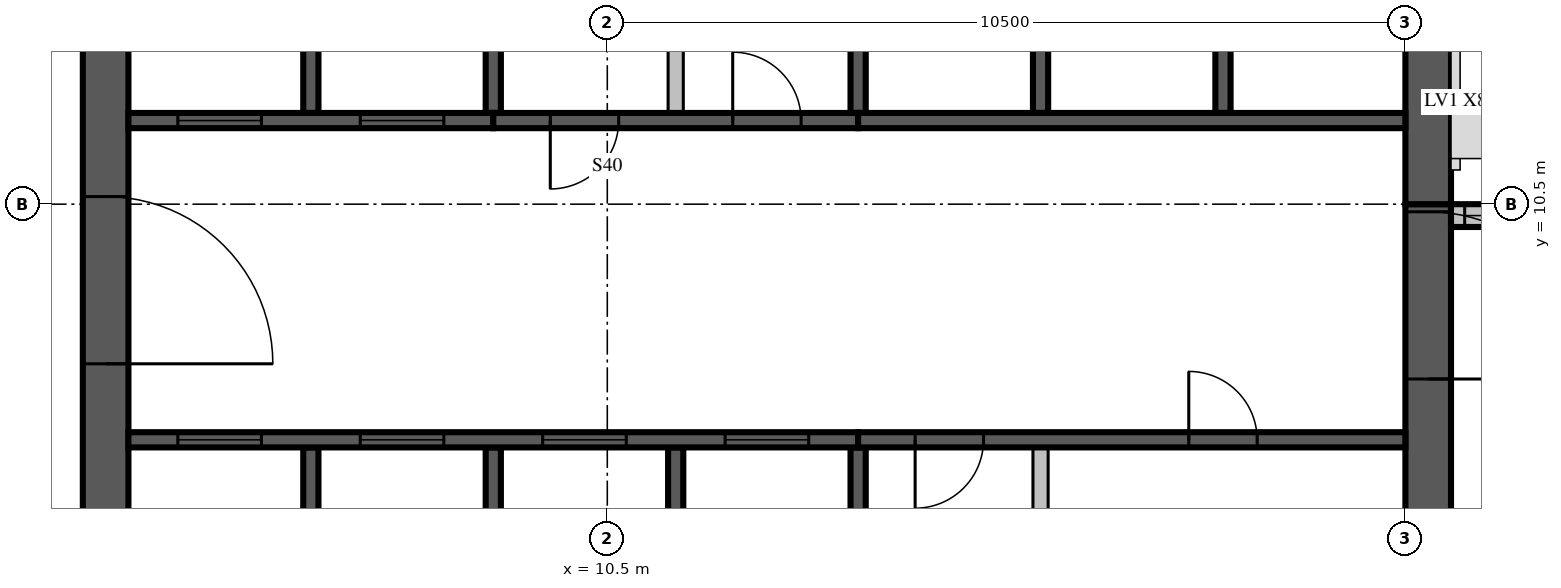
"""IFC4 building model, lengths in metres.
Left out: names, types, materials, properties, quantities, classifications, styles, units other than length and angle.
Written with IfcOpenShell. Run it as: python <this file> out.ifc"""

import sys

from ifc_helpers import new_model, si_unit, direction, frame, frame_2d, origin, place, context, subcontext, project, spatial, rectangle, extrude, source, transform, mapped, element, fill, save


model = new_model("IFC4")
c1 = context("Model", 3, precision=1e-05, world=origin(), true_north=direction((0.0, 1.0)))
c2 = subcontext(c1, "Body", "Model", "MODEL_VIEW")
j1 = project(units=[si_unit("LENGTHUNIT", "METRE"), si_unit("PLANEANGLEUNIT", "RADIAN")], contexts=[c1])
p1 = place(None, origin())
s1 = spatial("IfcSite", under=j1, at=p1, CompositionType="ELEMENT")
p2 = place(p1, origin())
s2 = spatial("IfcBuilding", under=s1, at=p2, CompositionType="ELEMENT")
p3 = place(p2, frame((0.0, 0.0, 361.5)))
s3 = spatial("IfcBuildingStorey", under=s2, at=p3, CompositionType="ELEMENT", Elevation=361.5)
m1 = source(origin(), c2, "Body", "SweptSolid", [
    extrude(rectangle(XDim=17.4, YDim=0.6, at=frame_2d((8.7, 0.0))), origin(), (0.0, 0.0, 1.0), 3.5),
])
p4 = place(p3, frame((3.9, 4.2, 0.0), z_axis=(0.0, 0.0, 1.0), x_axis=(0.0, 1.0, 0.0)))
e1 = element("IfcWall", 1, at=p4, inside=s3, PredefinedType="SHEAR", context=c2, shape_type="MappedRepresentation", body=[
    mapped(m1, transform((0.0, 0.0, 0.0), scale=1.0)),
])
m2 = source(origin(), c2, "Body", "SweptSolid", [
    extrude(rectangle(XDim=2.2, YDim=2.1, at=frame_2d((1.1, 1.05))), frame((0.0, 0.31, 0.0), z_axis=(0.0, -1.0, 0.0), x_axis=(1.0, 0.0, 0.0)), (0.0, 0.0, 1.0), 0.62),
])
p5 = place(p4, frame((4.2, 0.0, 0.0)))
e2 = element("IfcOpeningElement", 2, at=p5, cuts=e1, PredefinedType="OPENING", context=c2, shape_type="MappedRepresentation", body=[
    mapped(m2, transform((0.0, 0.0, 0.0), scale=1.0)),
])
m3 = source(origin(), c2, "Body", "SweptSolid", [
    extrude(rectangle(XDim=6.3, YDim=0.6, at=frame_2d((3.15, 0.0))), origin(), (0.0, 0.0, 1.0), 3.5),
])
p6 = place(p3, frame((21.3, 4.2, 0.0), z_axis=(0.0, 0.0, 1.0), x_axis=(0.0, 1.0, 0.0)))
e3 = element("IfcWall", 3, at=p6, inside=s3, PredefinedType="SHEAR", context=c2, shape_type="MappedRepresentation", body=[
    mapped(m3, transform((0.0, 0.0, 0.0), scale=1.0)),
])
p7 = place(p6, frame((4.0, 0.0, 0.0)))
e4 = element("IfcOpeningElement", 4, at=p7, cuts=e3, PredefinedType="OPENING", context=c2, shape_type="MappedRepresentation", body=[
    mapped(m2, transform((0.0, 0.0, 0.0), scale=1.0)),
])
m4 = source(origin(), c2, "Body", "SweptSolid", [
    extrude(rectangle(XDim=10.5, YDim=0.6, at=frame_2d((5.25, 0.0))), origin(), (0.0, 0.0, 1.0), 3.5),
])
p8 = place(p3, frame((21.3, 10.5, 0.0), z_axis=(0.0, 0.0, 1.0), x_axis=(0.0, 1.0, 0.0)))
e5 = element("IfcWall", 5, at=p8, inside=s3, PredefinedType="SHEAR", context=c2, shape_type="MappedRepresentation", body=[
    mapped(m4, transform((0.0, 0.0, 0.0), scale=1.0)),
])
m5 = source(origin(), c2, "Body", "SweptSolid", [
    extrude(rectangle(XDim=1.2, YDim=2.4, at=frame_2d((0.6, 1.2))), frame((0.0, 0.31, 0.0), z_axis=(0.0, -1.0, 0.0), x_axis=(1.0, 0.0, 0.0)), (0.0, 0.0, 1.0), 0.62),
])
p9 = place(p8, frame((5.7, 0.0, 0.6)))
e6 = element("IfcOpeningElement", 6, at=p9, cuts=e5, PredefinedType="OPENING", context=c2, shape_type="MappedRepresentation", body=[
    mapped(m5, transform((0.0, 0.0, 0.0), scale=1.0)),
])
m6 = source(origin(), c2, "Body", "SweptSolid", [
    extrude(rectangle(XDim=7.5, YDim=0.3, at=frame_2d((3.75, 0.0))), origin(), (0.0, 0.0, 1.0), 3.1),
])
p10 = place(p3, frame((29.1, 10.35, 0.0), z_axis=(0.0, 0.0, 1.0), x_axis=(-1.0, 0.0, 0.0)))
e7 = element("IfcWall", 7, at=p10, inside=s3, PredefinedType="STANDARD", context=c2, shape_type="MappedRepresentation", body=[
    mapped(m6, transform((0.0, 0.0, 0.0), scale=1.0)),
])
m7 = source(origin(), c2, "Body", "SweptSolid", [
    extrude(rectangle(XDim=3.0, YDim=2.0, at=frame_2d((1.5, 1.0))), frame((0.0, 0.16, 0.0), z_axis=(0.0, -1.0, 0.0), x_axis=(1.0, 0.0, 0.0)), (0.0, 0.0, 1.0), 0.32),
])
p11 = place(p10, frame((1.14, 0.0, 0.6)))
e8 = element("IfcOpeningElement", 8, at=p11, cuts=e7, PredefinedType="OPENING", context=c2, shape_type="MappedRepresentation", body=[
    mapped(m7, transform((0.0, 0.0, 0.0), scale=1.0)),
])
m8 = source(origin(), c2, "Body", "SweptSolid", [
    extrude(rectangle(XDim=1.8, YDim=2.0, at=frame_2d((0.9, 1.0))), frame((0.0, 0.16, 0.0), z_axis=(0.0, -1.0, 0.0), x_axis=(1.0, 0.0, 0.0)), (0.0, 0.0, 1.0), 0.32),
])
p12 = place(p10, frame((5.52, 0.0, 0.6)))
e9 = element("IfcOpeningElement", 9, at=p12, cuts=e7, PredefinedType="OPENING", context=c2, shape_type="MappedRepresentation", body=[
    mapped(m8, transform((0.0, 0.0, 0.0), scale=1.0)),
])
m9 = source(origin(), c2, "Body", "SweptSolid", [
    extrude(rectangle(XDim=3.1, YDim=0.2, at=frame_2d((1.55, 0.0))), origin(), (0.0, 0.0, 1.0), 3.5),
])
for number, where, z_axis, x_axis in (
    (10, (6.6, 4.2, 0.0), (0.0, 0.0, 1.0), (0.0, 1.0, 0.0)),
    (11, (9.0, 4.2, 0.0), (0.0, 0.0, 1.0), (0.0, 1.0, 0.0)),
    (12, (11.4, 4.2, 0.0), (0.0, 0.0, 1.0), (0.0, 1.0, 0.0)),
):
    element("IfcWall", number, at=place(p3, frame(where, z_axis=z_axis, x_axis=x_axis)), inside=s3, PredefinedType="SOLIDWALL", context=c2, shape_type="MappedRepresentation", body=[
        mapped(m9, transform((0.0, 0.0, 0.0), scale=1.0)),
    ])
m10 = source(origin(), c2, "Body", "SweptSolid", [
    extrude(rectangle(XDim=3.1, YDim=0.2, at=frame_2d((1.55, 0.0))), origin(), (0.0, 0.0, 1.0), 3.1),
])
p13 = place(p3, frame((13.8, 4.2, 0.0), z_axis=(0.0, 0.0, 1.0), x_axis=(0.0, 1.0, 0.0)))
e13 = element("IfcWall", 13, at=p13, inside=s3, PredefinedType="SOLIDWALL", context=c2, shape_type="MappedRepresentation", body=[
    mapped(m10, transform((0.0, 0.0, 0.0), scale=1.0)),
])
m11 = source(origin(), c2, "Body", "SweptSolid", [
    extrude(rectangle(XDim=3.1, YDim=0.2, at=frame_2d((1.55, 0.0))), origin(), (0.0, 0.0, 1.0), 3.1),
])
p14 = place(p3, frame((16.2, 4.2, 0.0), z_axis=(0.0, 0.0, 1.0), x_axis=(0.0, 1.0, 0.0)))
e14 = element("IfcWall", 14, at=p14, inside=s3, PredefinedType="PARTITIONING", context=c2, shape_type="MappedRepresentation", body=[
    mapped(m11, transform((0.0, 0.0, 0.0), scale=1.0)),
])
m12 = source(origin(), c2, "Body", "SweptSolid", [
    extrude(rectangle(XDim=3.0, YDim=0.2, at=frame_2d((1.5, 0.0))), origin(), (0.0, 0.0, 1.0), 3.5),
])
p15 = place(p3, frame((6.6, 11.7, 0.0), z_axis=(0.0, 0.0, 1.0), x_axis=(0.0, 1.0, 0.0)))
e15 = element("IfcWall", 15, at=p15, inside=s3, PredefinedType="SOLIDWALL", context=c2, shape_type="MappedRepresentation", body=[
    mapped(m12, transform((0.0, 0.0, 0.0), scale=1.0)),
])
m13 = source(origin(), c2, "Body", "SweptSolid", [
    extrude(rectangle(XDim=3.0, YDim=0.2, at=frame_2d((1.5, 0.0))), origin(), (0.0, 0.0, 1.0), 3.1),
])
for number, where, z_axis, x_axis in (
    (16, (9.0, 11.7, 0.0), (0.0, 0.0, 1.0), (0.0, 1.0, 0.0)),
    (17, (13.8, 11.7, 0.0), (0.0, 0.0, 1.0), (0.0, 1.0, 0.0)),
):
    element("IfcWall", number, at=place(p3, frame(where, z_axis=z_axis, x_axis=x_axis)), inside=s3, PredefinedType="SOLIDWALL", context=c2, shape_type="MappedRepresentation", body=[
        mapped(m13, transform((0.0, 0.0, 0.0), scale=1.0)),
    ])
for number, where, z_axis, x_axis in (
    (18, (16.2, 11.7, 0.0), (0.0, 0.0, 1.0), (0.0, 1.0, 0.0)),
    (19, (18.6, 11.7, 0.0), (0.0, 0.0, 1.0), (0.0, 1.0, 0.0)),
):
    element("IfcWall", number, at=place(p3, frame(where, z_axis=z_axis, x_axis=x_axis)), inside=s3, PredefinedType="SOLIDWALL", context=c2, shape_type="MappedRepresentation", body=[
        mapped(m12, transform((0.0, 0.0, 0.0), scale=1.0)),
    ])
m14 = source(origin(), c2, "Body", "SweptSolid", [
    extrude(rectangle(XDim=3.0, YDim=0.2, at=frame_2d((1.5, 0.0))), origin(), (0.0, 0.0, 1.0), 3.1),
])
p16 = place(p3, frame((11.4, 11.7, 0.0), z_axis=(0.0, 0.0, 1.0), x_axis=(0.0, 1.0, 0.0)))
e20 = element("IfcWall", 20, at=p16, inside=s3, PredefinedType="PARTITIONING", context=c2, shape_type="MappedRepresentation", body=[
    mapped(m14, transform((0.0, 0.0, 0.0), scale=1.0)),
])
m15 = source(origin(), c2, "Body", "SweptSolid", [
    extrude(rectangle(XDim=9.6, YDim=0.2, at=frame_2d((4.8, 0.0))), origin(), (0.0, 0.0, 1.0), 3.5),
])
p17 = place(p3, frame((4.2, 7.4, 0.0), z_axis=(0.0, 0.0, 1.0), x_axis=(1.0, 0.0, 0.0)))
e21 = element("IfcWall", 21, at=p17, inside=s3, PredefinedType="SOLIDWALL", context=c2, shape_type="MappedRepresentation", body=[
    mapped(m15, transform((0.0, 0.0, 0.0), scale=1.0)),
])
m16 = source(origin(), c2, "Body", "SweptSolid", [
    extrude(rectangle(XDim=1.1, YDim=2.1, at=frame_2d((0.55, 1.05))), frame((0.0, 0.11, 0.0), z_axis=(0.0, -1.0, 0.0), x_axis=(1.0, 0.0, 0.0)), (0.0, 0.0, 1.0), 0.22),
])
p18 = place(p17, frame((0.65, 0.0, 0.0)))
e22 = element("IfcOpeningElement", 22, at=p18, cuts=e21, PredefinedType="OPENING", context=c2, shape_type="MappedRepresentation", body=[
    mapped(m16, transform((0.0, 0.0, 0.0), scale=1.0)),
])
p19 = place(p17, frame((3.05, 0.0, 0.0)))
e23 = element("IfcOpeningElement", 23, at=p19, cuts=e21, PredefinedType="OPENING", context=c2, shape_type="MappedRepresentation", body=[
    mapped(m16, transform((0.0, 0.0, 0.0), scale=1.0)),
])
p20 = place(p17, frame((5.45, 0.0, 0.0)))
e24 = element("IfcOpeningElement", 24, at=p20, cuts=e21, PredefinedType="OPENING", context=c2, shape_type="MappedRepresentation", body=[
    mapped(m16, transform((0.0, 0.0, 0.0), scale=1.0)),
])
p21 = place(p17, frame((7.85, 0.0, 0.0)))
e25 = element("IfcOpeningElement", 25, at=p21, cuts=e21, PredefinedType="OPENING", context=c2, shape_type="MappedRepresentation", body=[
    mapped(m16, transform((0.0, 0.0, 0.0), scale=1.0)),
])
m17 = source(origin(), c2, "Body", "SweptSolid", [
    extrude(rectangle(XDim=7.2, YDim=0.2, at=frame_2d((3.6, 0.0))), origin(), (0.0, 0.0, 1.0), 3.1),
])
p22 = place(p3, frame((13.8, 7.4, 0.0), z_axis=(0.0, 0.0, 1.0), x_axis=(1.0, 0.0, 0.0)))
e26 = element("IfcWall", 26, at=p22, inside=s3, PredefinedType="SOLIDWALL", context=c2, shape_type="MappedRepresentation", body=[
    mapped(m17, transform((0.0, 0.0, 0.0), scale=1.0)),
])
m18 = source(origin(), c2, "Body", "SweptSolid", [
    extrude(rectangle(XDim=0.9, YDim=2.1, at=frame_2d((0.45, 1.05))), frame((0.0, 0.11, 0.0), z_axis=(0.0, -1.0, 0.0), x_axis=(1.0, 0.0, 0.0)), (0.0, 0.0, 1.0), 0.22),
])
p23 = place(p22, frame((0.75, 0.0, 0.0)))
e27 = element("IfcOpeningElement", 27, at=p23, cuts=e26, PredefinedType="OPENING", context=c2, shape_type="MappedRepresentation", body=[
    mapped(m18, transform((0.0, 0.0, 0.0), scale=1.0)),
])
p24 = place(p22, frame((4.35, 0.0, 0.0)))
e28 = element("IfcOpeningElement", 28, at=p24, cuts=e26, PredefinedType="OPENING", context=c2, shape_type="MappedRepresentation", body=[
    mapped(m18, transform((0.0, 0.0, 0.0), scale=1.0)),
])
m19 = source(origin(), c2, "Body", "SweptSolid", [
    extrude(rectangle(XDim=4.8, YDim=0.2, at=frame_2d((2.4, 0.0))), origin(), (0.0, 0.0, 1.0), 3.5),
])
p25 = place(p3, frame((4.2, 11.6, 0.0), z_axis=(0.0, 0.0, 1.0), x_axis=(1.0, 0.0, 0.0)))
e29 = element("IfcWall", 29, at=p25, inside=s3, PredefinedType="SOLIDWALL", context=c2, shape_type="MappedRepresentation", body=[
    mapped(m19, transform((0.0, 0.0, 0.0), scale=1.0)),
])
p26 = place(p25, frame((0.65, 0.0, 0.0)))
e30 = element("IfcOpeningElement", 30, at=p26, cuts=e29, PredefinedType="OPENING", context=c2, shape_type="MappedRepresentation", body=[
    mapped(m16, transform((0.0, 0.0, 0.0), scale=1.0)),
])
p27 = place(p25, frame((3.05, 0.0, 0.0)))
e31 = element("IfcOpeningElement", 31, at=p27, cuts=e29, PredefinedType="OPENING", context=c2, shape_type="MappedRepresentation", body=[
    mapped(m16, transform((0.0, 0.0, 0.0), scale=1.0)),
])
m20 = source(origin(), c2, "Body", "SweptSolid", [
    extrude(rectangle(XDim=4.8, YDim=0.2, at=frame_2d((2.4, 0.0))), origin(), (0.0, 0.0, 1.0), 3.1),
])
p28 = place(p3, frame((9.0, 11.6, 0.0), z_axis=(0.0, 0.0, 1.0), x_axis=(1.0, 0.0, 0.0)))
e32 = element("IfcWall", 32, at=p28, inside=s3, PredefinedType="SOLIDWALL", context=c2, shape_type="MappedRepresentation", body=[
    mapped(m20, transform((0.0, 0.0, 0.0), scale=1.0)),
])
p29 = place(p28, frame((0.75, 0.0, 0.0)))
e33 = element("IfcOpeningElement", 33, at=p29, cuts=e32, PredefinedType="OPENING", context=c2, shape_type="MappedRepresentation", body=[
    mapped(m18, transform((0.0, 0.0, 0.0), scale=1.0)),
])
p30 = place(p28, frame((3.15, 0.0, 0.0)))
e34 = element("IfcOpeningElement", 34, at=p30, cuts=e32, PredefinedType="OPENING", context=c2, shape_type="MappedRepresentation", body=[
    mapped(m18, transform((0.0, 0.0, 0.0), scale=1.0)),
])
m21 = source(origin(), c2, "Body", "SweptSolid", [
    extrude(rectangle(XDim=7.2, YDim=0.2, at=frame_2d((3.6, 0.0))), origin(), (0.0, 0.0, 1.0), 3.5),
])
p31 = place(p3, frame((13.8, 11.6, 0.0), z_axis=(0.0, 0.0, 1.0), x_axis=(1.0, 0.0, 0.0)))
e35 = element("IfcWall", 35, at=p31, inside=s3, PredefinedType="SOLIDWALL", context=c2, shape_type="MappedRepresentation", body=[
    mapped(m21, transform((0.0, 0.0, 0.0), scale=1.0)),
])
m22 = source(origin(), c2, "Body", "SweptSolid", [
    extrude(rectangle(XDim=1.8, YDim=2.0, at=frame_2d((0.9, 1.0))), frame((0.0, 0.03, 0.0), z_axis=(0.0, -1.0, 0.0), x_axis=(1.0, 0.0, 0.0)), (0.0, 0.0, 1.0), 0.06),
])
p32 = place(p12, origin())
e36 = element("IfcWindow", 36, at=p32, inside=s3, PartitioningType="SINGLE_PANEL", PredefinedType="WINDOW", context=c2, shape_type="MappedRepresentation", body=[
    mapped(m22, transform((0.0, 0.0, 0.0), scale=1.0)),
])
fill(e9, e36)
m23 = source(origin(), c2, "Body", "SweptSolid", [
    extrude(rectangle(XDim=1.1, YDim=2.1, at=frame_2d((0.55, 1.05))), frame((0.0, 0.025, 0.0), z_axis=(0.0, -1.0, 0.0), x_axis=(1.0, 0.0, 0.0)), (0.0, 0.0, 1.0), 0.05),
])
p33 = place(p18, origin())
e37 = element("IfcDoor", 37, at=p33, inside=s3, OperationType="SLIDING_TO_LEFT", PredefinedType="DOOR", context=c2, shape_type="MappedRepresentation", body=[
    mapped(m23, transform((0.0, 0.0, 0.0), scale=1.0)),
])
fill(e22, e37)
p34 = place(p19, origin())
e38 = element("IfcDoor", 38, at=p34, inside=s3, OperationType="SLIDING_TO_LEFT", PredefinedType="DOOR", context=c2, shape_type="MappedRepresentation", body=[
    mapped(m23, transform((0.0, 0.0, 0.0), scale=1.0)),
])
fill(e23, e38)
p35 = place(p20, origin())
e39 = element("IfcDoor", 39, at=p35, inside=s3, OperationType="SLIDING_TO_LEFT", PredefinedType="DOOR", context=c2, shape_type="MappedRepresentation", body=[
    mapped(m23, transform((0.0, 0.0, 0.0), scale=1.0)),
])
fill(e24, e39)
p36 = place(p21, origin())
e40 = element("IfcDoor", 40, at=p36, inside=s3, OperationType="SLIDING_TO_LEFT", PredefinedType="DOOR", context=c2, shape_type="MappedRepresentation", body=[
    mapped(m23, transform((0.0, 0.0, 0.0), scale=1.0)),
])
fill(e25, e40)
m24 = source(origin(), c2, "Body", "SweptSolid", [
    extrude(rectangle(XDim=0.9, YDim=2.1, at=frame_2d((0.45, 1.05))), frame((0.0, 0.025, 0.0), z_axis=(0.0, -1.0, 0.0), x_axis=(1.0, 0.0, 0.0)), (0.0, 0.0, 1.0), 0.05),
])
p37 = place(p23, origin())
e41 = element("IfcDoor", 41, at=p37, inside=s3, OperationType="SINGLE_SWING_RIGHT", PredefinedType="DOOR", context=c2, shape_type="MappedRepresentation", body=[
    mapped(m24, transform((0.0, 0.0, 0.0), scale=1.0)),
])
fill(e27, e41)
p38 = place(p24, origin())
e42 = element("IfcDoor", 42, at=p38, inside=s3, OperationType="SINGLE_SWING_LEFT", PredefinedType="DOOR", context=c2, shape_type="MappedRepresentation", body=[
    mapped(m24, transform((0.0, 0.0, 0.0), scale=1.0)),
])
fill(e28, e42)
p39 = place(p26, origin())
e43 = element("IfcDoor", 43, at=p39, inside=s3, OperationType="SLIDING_TO_LEFT", PredefinedType="DOOR", context=c2, shape_type="MappedRepresentation", body=[
    mapped(m23, transform((0.0, 0.0, 0.0), scale=1.0)),
])
fill(e30, e43)
p40 = place(p27, origin())
e44 = element("IfcDoor", 44, at=p40, inside=s3, OperationType="SLIDING_TO_LEFT", PredefinedType="DOOR", context=c2, shape_type="MappedRepresentation", body=[
    mapped(m23, transform((0.0, 0.0, 0.0), scale=1.0)),
])
fill(e31, e44)
p41 = place(p29, origin())
e45 = element("IfcDoor", 45, at=p41, inside=s3, OperationType="SINGLE_SWING_RIGHT", PredefinedType="DOOR", context=c2, shape_type="MappedRepresentation", body=[
    mapped(m24, transform((0.0, 0.0, 0.0), scale=1.0)),
])
fill(e33, e45)
p42 = place(p30, origin())
e46 = element("IfcDoor", 46, at=p42, inside=s3, OperationType="SINGLE_SWING_LEFT", PredefinedType="DOOR", context=c2, shape_type="MappedRepresentation", body=[
    mapped(m24, transform((0.0, 0.0, 0.0), scale=1.0)),
])
fill(e34, e46)
m25 = source(origin(), c2, "Body", "SweptSolid", [
    extrude(rectangle(XDim=2.2, YDim=2.1, at=frame_2d((1.1, 1.05))), frame((0.0, 0.025, 0.0), z_axis=(0.0, -1.0, 0.0), x_axis=(1.0, 0.0, 0.0)), (0.0, 0.0, 1.0), 0.05),
])
p43 = place(p7, origin())
e47 = element("IfcDoor", 47, at=p43, inside=s3, OperationType="DOUBLE_DOOR_SINGLE_SWING", PredefinedType="DOOR", context=c2, shape_type="MappedRepresentation", body=[
    mapped(m25, transform((0.0, 0.0, 0.0), scale=1.0)),
])
fill(e4, e47)
p44 = place(p5, origin())
e48 = element("IfcDoor", 48, at=p44, inside=s3, OperationType="DOUBLE_DOOR_SINGLE_SWING", PredefinedType="DOOR", context=c2, shape_type="MappedRepresentation", body=[
    mapped(m25, transform((0.0, 0.0, 0.0), scale=1.0)),
])
fill(e2, e48)
save(model, sys.argv[1])
